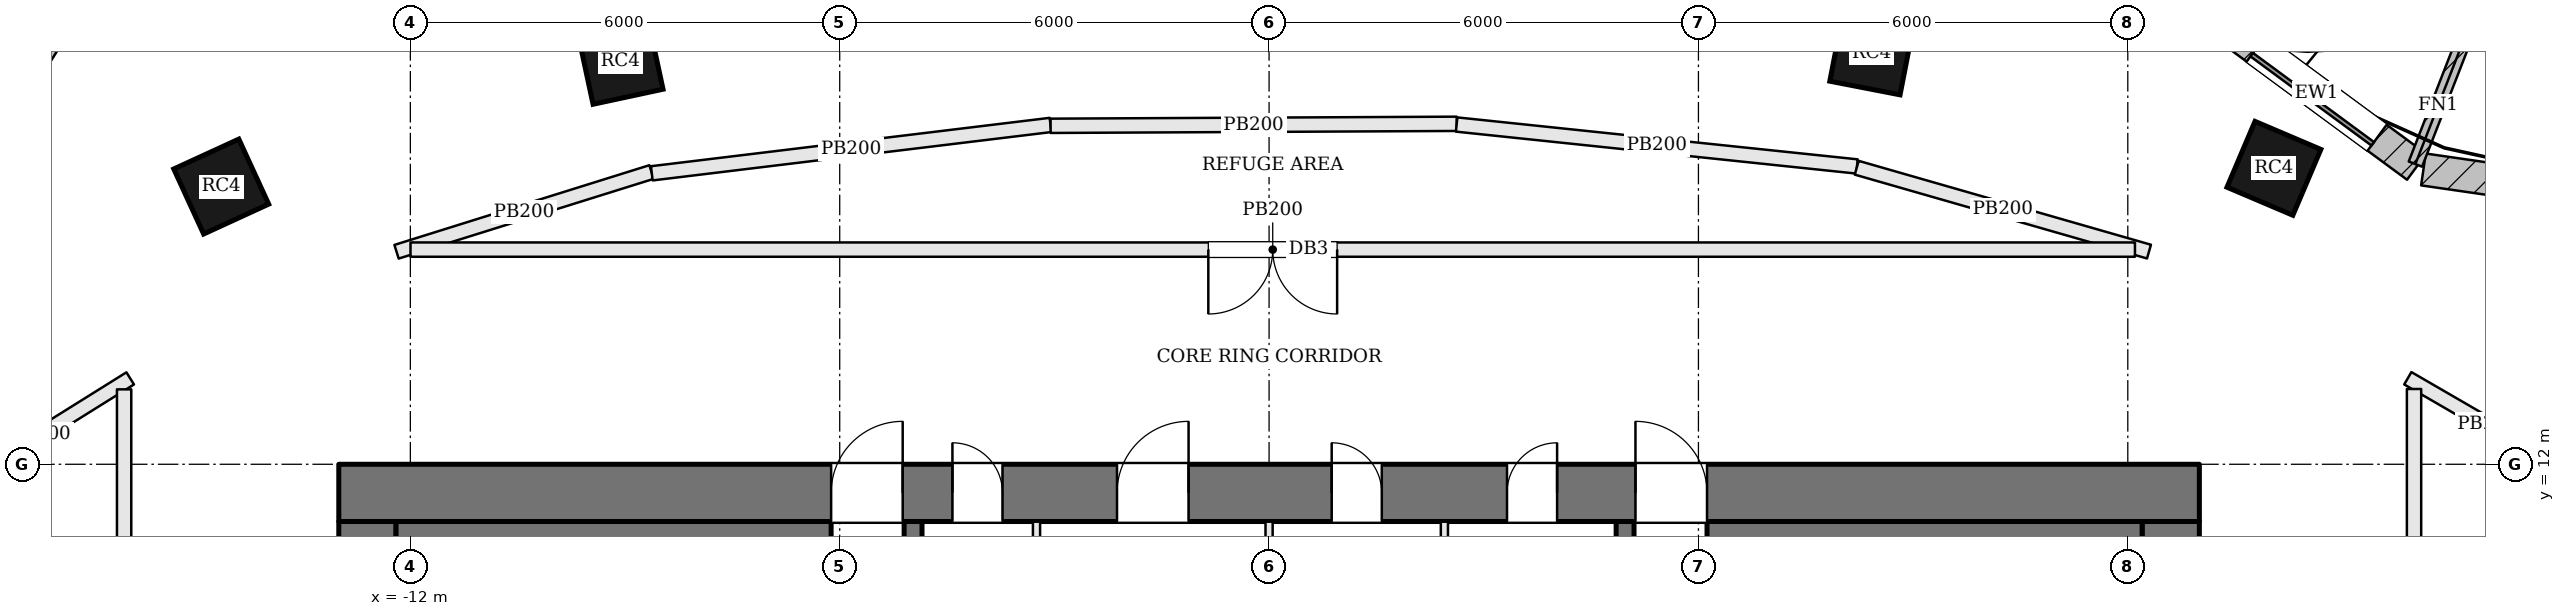
"""IFC4 building model, lengths in metres.
Left out: names, types, materials, properties, quantities, classifications, styles, units other than length and angle.
Written with IfcOpenShell. Run it as: python <this file> out.ifc"""

import sys

from ifc_helpers import new_model, si_unit, direction, frame, frame_2d, origin, origin_2d, place, context, subcontext, project, spatial, rectangle, extrude, element, fill, save


model = new_model("IFC4")
c1 = context("Model", 3, precision=1e-05, world=origin(), true_north=direction((0.0, 1.0)))
c2 = subcontext(c1, "Body", "Model", "MODEL_VIEW")
j1 = project(units=[si_unit("LENGTHUNIT", "METRE"), si_unit("PLANEANGLEUNIT", "RADIAN")], contexts=[c1])
p1 = place(None, origin())
s1 = spatial("IfcSite", under=j1, at=p1, CompositionType="ELEMENT")
p2 = place(p1, origin())
s2 = spatial("IfcBuilding", under=s1, at=p2, CompositionType="ELEMENT")
p3 = place(p2, frame((0.0, 0.0, 193.5)))
s3 = spatial("IfcBuildingStorey", under=s2, at=p3, CompositionType="ELEMENT", Elevation=193.5)
p4 = place(p3, frame((-13.0, 11.6, 0.0), z_axis=(0.0, 0.0, 1.0), x_axis=(1.0, 0.0, 0.0)))
e1 = element("IfcWall", 1, at=p4, inside=s3, PredefinedType="SHEAR", context=c2, shape_type="SweptSolid", body=[
    extrude(rectangle(XDim=26.0, YDim=0.8, at=frame_2d((13.0, 0.0))), origin(), (0.0, 0.0, 1.0), 3.9),
])
p5 = place(p4, frame((8.575, 0.0, 0.0)))
e2 = element("IfcOpeningElement", 2, at=p5, cuts=e1, PredefinedType="OPENING", context=c2, shape_type="SweptSolid", body=[
    extrude(rectangle(XDim=0.7, YDim=2.1, at=frame_2d((0.35, 1.05))), frame((0.0, 0.41, 0.0), z_axis=(0.0, -1.0, 0.0), x_axis=(1.0, 0.0, 0.0)), (0.0, 0.0, 1.0), 0.82),
])
p6 = place(p4, frame((10.875, 0.0, 0.0)))
e3 = element("IfcOpeningElement", 3, at=p6, cuts=e1, PredefinedType="OPENING", context=c2, shape_type="SweptSolid", body=[
    extrude(rectangle(XDim=1.0, YDim=2.1, at=frame_2d((0.5, 1.05))), frame((0.0, 0.41, 0.0), z_axis=(0.0, -1.0, 0.0), x_axis=(1.0, 0.0, 0.0)), (0.0, 0.0, 1.0), 0.82),
])
p7 = place(p4, frame((13.875, 0.0, 0.0)))
e4 = element("IfcOpeningElement", 4, at=p7, cuts=e1, PredefinedType="OPENING", context=c2, shape_type="SweptSolid", body=[
    extrude(rectangle(XDim=0.7, YDim=2.1, at=frame_2d((0.35, 1.05))), frame((0.0, 0.41, 0.0), z_axis=(0.0, -1.0, 0.0), x_axis=(1.0, 0.0, 0.0)), (0.0, 0.0, 1.0), 0.82),
])
p8 = place(p4, frame((16.325, 0.0, 0.0)))
e5 = element("IfcOpeningElement", 5, at=p8, cuts=e1, PredefinedType="OPENING", context=c2, shape_type="SweptSolid", body=[
    extrude(rectangle(XDim=0.7, YDim=2.1, at=frame_2d((0.35, 1.05))), frame((0.0, 0.41, 0.0), z_axis=(0.0, -1.0, 0.0), x_axis=(1.0, 0.0, 0.0)), (0.0, 0.0, 1.0), 0.82),
])
p9 = place(p4, frame((6.88, 0.0, 0.0)))
e6 = element("IfcOpeningElement", 6, at=p9, cuts=e1, PredefinedType="OPENING", context=c2, shape_type="SweptSolid", body=[
    extrude(rectangle(XDim=1.0, YDim=2.1, at=frame_2d((0.5, 1.05))), frame((0.0, 0.41, 0.0), z_axis=(0.0, -1.0, 0.0), x_axis=(1.0, 0.0, 0.0)), (0.0, 0.0, 1.0), 0.82),
])
p10 = place(p4, frame((18.12, 0.0, 0.0)))
e7 = element("IfcOpeningElement", 7, at=p10, cuts=e1, PredefinedType="OPENING", context=c2, shape_type="SweptSolid", body=[
    extrude(rectangle(XDim=1.0, YDim=2.1, at=frame_2d((0.5, 1.05))), frame((0.0, 0.41, 0.0), z_axis=(0.0, -1.0, 0.0), x_axis=(1.0, 0.0, 0.0)), (0.0, 0.0, 1.0), 0.82),
])
p11 = place(p3, frame((12.6, -2.2, 0.0), z_axis=(0.0, 0.0, 1.0), x_axis=(0.0, 1.0, 0.0)))
e8 = element("IfcWall", 8, at=p11, inside=s3, PredefinedType="SHEAR", context=c2, shape_type="SweptSolid", body=[
    extrude(rectangle(XDim=13.4, YDim=0.8, at=frame_2d((6.7, 0.0))), origin(), (0.0, 0.0, 1.0), 3.9),
])
p12 = place(p11, frame((7.4, 0.0, 0.0)))
e9 = element("IfcOpeningElement", 9, at=p12, cuts=e8, PredefinedType="OPENING", context=c2, shape_type="SweptSolid", body=[
    extrude(rectangle(XDim=1.8, YDim=2.1, at=frame_2d((0.9, 1.05))), frame((0.0, 0.41, 0.0), z_axis=(0.0, -1.0, 0.0), x_axis=(1.0, 0.0, 0.0)), (0.0, 0.0, 1.0), 0.82),
])
p13 = place(p3, frame((-12.6, -2.2, 0.0), z_axis=(0.0, 0.0, 1.0), x_axis=(0.0, 1.0, 0.0)))
e10 = element("IfcWall", 10, at=p13, inside=s3, PredefinedType="SHEAR", context=c2, shape_type="SweptSolid", body=[
    extrude(rectangle(XDim=13.4, YDim=0.8, at=frame_2d((6.7, 0.0))), origin(), (0.0, 0.0, 1.0), 3.9),
])
p14 = place(p13, frame((4.2, 0.0, 0.0)))
e11 = element("IfcOpeningElement", 11, at=p14, cuts=e10, PredefinedType="OPENING", context=c2, shape_type="SweptSolid", body=[
    extrude(rectangle(XDim=1.8, YDim=2.1, at=frame_2d((0.9, 1.05))), frame((0.0, 0.41, 0.0), z_axis=(0.0, -1.0, 0.0), x_axis=(1.0, 0.0, 0.0)), (0.0, 0.0, 1.0), 0.82),
])
for number, where, z_axis, x_axis in (
    (12, (14.042, 16.136, 0.0), (0.0, 0.0, 1.0), (-0.92, 0.392, 0.0)),
    (13, (8.422, 17.749, 0.0), (0.0, 0.0, 1.0), (-0.982, 0.191, 0.0)),
    (14, (-9.063, 17.625, 0.0), (0.0, 0.0, 1.0), (-0.978, -0.21, 0.0)),
    (15, (-14.643, 15.881, 0.0), (0.0, 0.0, 1.0), (-0.909, -0.417, 0.0)),
):
    element("IfcColumn", number, at=place(p3, frame(where, z_axis=z_axis, x_axis=x_axis)), inside=s3, PredefinedType="COLUMN", context=c2, shape_type="SweptSolid", body=[
        extrude(rectangle(XDim=1.0, YDim=1.0, at=origin_2d()), origin(), (0.0, 0.0, 1.0), 3.9),
    ])
p15 = place(p3, frame((21.825, 15.297, 0.0), z_axis=(0.0, 0.0, 1.0), x_axis=(-0.98971474215, 0.143054986527, 0.0)))
e16 = element("IfcWall", 16, at=p15, inside=s3, PredefinedType="SOLIDWALL", context=c2, shape_type="SweptSolid", body=[
    extrude(rectangle(XDim=5.753, YDim=0.45, at=frame_2d((2.876, 0.0))), origin(), (0.0, 0.0, 1.0), 3.7),
])
p16 = place(p15, frame((1.826, 0.0, 0.9)))
e17 = element("IfcOpeningElement", 17, at=p16, cuts=e16, PredefinedType="OPENING", context=c2, shape_type="SweptSolid", body=[
    extrude(rectangle(XDim=2.1, YDim=2.3, at=frame_2d((1.05, 1.15))), frame((0.0, 0.235, 0.0), z_axis=(0.0, -1.0, 0.0), x_axis=(1.0, 0.0, 0.0)), (0.0, 0.0, 1.0), 0.47),
])
p17 = place(p3, frame((16.036, 16.158, 0.0), z_axis=(0.0, 0.0, 1.0), x_axis=(-0.805181432967, 0.593028549064, 0.0)))
e18 = element("IfcWall", 18, at=p17, inside=s3, PredefinedType="SOLIDWALL", context=c2, shape_type="SweptSolid", body=[
    extrude(rectangle(XDim=3.469, YDim=0.45, at=frame_2d((1.734, 0.0))), origin(), (0.0, 0.0, 1.0), 3.7),
])
p18 = place(p17, frame((0.684, 0.0, 0.9)))
e19 = element("IfcOpeningElement", 19, at=p18, cuts=e18, PredefinedType="OPENING", context=c2, shape_type="SweptSolid", body=[
    extrude(rectangle(XDim=2.1, YDim=2.3, at=frame_2d((1.05, 1.15))), frame((0.0, 0.235, 0.0), z_axis=(0.0, -1.0, 0.0), x_axis=(1.0, 0.0, 0.0)), (0.0, 0.0, 1.0), 0.47),
])
p19 = place(p3, frame((-16.998, 18.099, 0.0), z_axis=(0.0, 0.0, 1.0), x_axis=(-0.532745661304, -0.846275404559, 0.0)))
e20 = element("IfcWall", 20, at=p19, inside=s3, PredefinedType="SOLIDWALL", context=c2, shape_type="SweptSolid", body=[
    extrude(rectangle(XDim=5.076, YDim=0.45, at=frame_2d((2.538, 0.0))), origin(), (0.0, 0.0, 1.0), 3.7),
])
p20 = place(p19, frame((1.638, 0.0, 0.9)))
e21 = element("IfcOpeningElement", 21, at=p20, cuts=e20, PredefinedType="OPENING", context=c2, shape_type="SweptSolid", body=[
    extrude(rectangle(XDim=1.8, YDim=2.3, at=frame_2d((0.9, 1.15))), frame((0.0, 0.235, 0.0), z_axis=(0.0, -1.0, 0.0), x_axis=(1.0, 0.0, 0.0)), (0.0, 0.0, 1.0), 0.47),
])
p21 = place(p3, frame((16.019, 16.195, 0.0), z_axis=(0.0, 0.0, 1.0), x_axis=(0.362641522028, 0.931928713208, 0.0)))
e22 = element("IfcWall", 22, at=p21, inside=s3, PredefinedType="SOLIDWALL", context=c2, shape_type="SweptSolid", body=[
    extrude(rectangle(XDim=1.75, YDim=0.2, at=frame_2d((0.875, 0.0))), origin(), (0.0, 0.0, 1.0), 3.7),
])
p22 = place(p3, frame((-4.975, -2.2, 0.0), z_axis=(0.0, 0.0, 1.0), x_axis=(0.0, 1.0, 0.0)))
e23 = element("IfcWall", 23, at=p22, inside=s3, PredefinedType="SOLIDWALL", context=c2, shape_type="SweptSolid", body=[
    extrude(rectangle(XDim=13.4, YDim=0.25, at=frame_2d((6.7, 0.0))), origin(), (0.0, 0.0, 1.0), 3.7),
])
p23 = place(p22, frame((5.25, 0.0, 0.0)))
e24 = element("IfcOpeningElement", 24, at=p23, cuts=e23, PredefinedType="OPENING", context=c2, shape_type="SweptSolid", body=[
    extrude(rectangle(XDim=1.2, YDim=2.1, at=frame_2d((0.6, 1.05))), frame((0.0, 0.135, 0.0), z_axis=(0.0, -1.0, 0.0), x_axis=(1.0, 0.0, 0.0)), (0.0, 0.0, 1.0), 0.27),
])
p24 = place(p3, frame((4.975, 11.2, 0.0), z_axis=(0.0, 0.0, 1.0), x_axis=(0.0, -1.0, 0.0)))
e25 = element("IfcWall", 25, at=p24, inside=s3, PredefinedType="SOLIDWALL", context=c2, shape_type="SweptSolid", body=[
    extrude(rectangle(XDim=13.4, YDim=0.25, at=frame_2d((6.7, 0.0))), origin(), (0.0, 0.0, 1.0), 3.7),
])
p25 = place(p24, frame((5.25, 0.0, 0.0)))
e26 = element("IfcOpeningElement", 26, at=p25, cuts=e25, PredefinedType="OPENING", context=c2, shape_type="SweptSolid", body=[
    extrude(rectangle(XDim=1.2, YDim=2.1, at=frame_2d((0.6, 1.05))), frame((0.0, 0.135, 0.0), z_axis=(0.0, -1.0, 0.0), x_axis=(1.0, 0.0, 0.0)), (0.0, 0.0, 1.0), 0.27),
])
for number, where, z_axis, x_axis in (
    (27, (-12.2, 10.9, 0.0), (0.0, 0.0, 1.0), (1.0, 0.0, 0.0)),
    (28, (12.2, 10.9, 0.0), (0.0, 0.0, 1.0), (-1.0, 0.0, 0.0)),
):
    element("IfcWall", number, at=place(p3, frame(where, z_axis=z_axis, x_axis=x_axis)), inside=s3, PredefinedType="SOLIDWALL", context=c2, shape_type="SweptSolid", body=[
        extrude(rectangle(XDim=6.08, YDim=0.6, at=frame_2d((3.04, 0.0))), origin(), (0.0, 0.0, 1.0), 3.7),
    ])
for number, where, z_axis, x_axis in (
    (29, (-3.25, 8.6, 0.0), (0.0, 0.0, 1.0), (0.0, 1.0, 0.0)),
    (30, (0.0, 8.6, 0.0), (0.0, 0.0, 1.0), (0.0, 1.0, 0.0)),
    (31, (2.45, 8.6, 0.0), (0.0, 0.0, 1.0), (0.0, 1.0, 0.0)),
):
    element("IfcWall", number, at=place(p3, frame(where, z_axis=z_axis, x_axis=x_axis)), inside=s3, PredefinedType="PARTITIONING", context=c2, shape_type="SweptSolid", body=[
        extrude(rectangle(XDim=2.6, YDim=0.1, at=frame_2d((1.3, 0.0))), origin(), (0.0, 0.0, 1.0), 3.7),
    ])
p26 = place(p3, frame((-18.422, 11.635, 0.0), z_axis=(0.0, 0.0, 1.0), x_axis=(0.848299824463, 0.529516201656, 0.0)))
e32 = element("IfcWall", 32, at=p26, inside=s3, PredefinedType="PARTITIONING", context=c2, shape_type="SweptSolid", body=[
    extrude(rectangle(XDim=2.955, YDim=0.2, at=frame_2d((1.478, 0.0))), origin(), (0.0, 0.0, 1.0), 3.7),
])
p27 = place(p3, frame((-16.0, 13.047, 0.0), z_axis=(0.0, 0.0, 1.0), x_axis=(0.0, -1.0, 0.0)))
e33 = element("IfcWall", 33, at=p27, inside=s3, PredefinedType="PARTITIONING", context=c2, shape_type="SweptSolid", body=[
    extrude(rectangle(XDim=18.947, YDim=0.2, at=frame_2d((9.474, 0.0))), origin(), (0.0, 0.0, 1.0), 3.7),
])
p28 = place(p27, frame((7.647, 0.0, 0.0)))
e34 = element("IfcOpeningElement", 34, at=p28, cuts=e33, PredefinedType="OPENING", context=c2, shape_type="SweptSolid", body=[
    extrude(rectangle(XDim=1.8, YDim=2.1, at=frame_2d((0.9, 1.05))), frame((0.0, 0.11, 0.0), z_axis=(0.0, -1.0, 0.0), x_axis=(1.0, 0.0, 0.0)), (0.0, 0.0, 1.0), 0.22),
])
p29 = place(p3, frame((15.913, 13.202, 0.0), z_axis=(0.0, 0.0, 1.0), x_axis=(0.86524014554, -0.501357647339, 0.0)))
e35 = element("IfcWall", 35, at=p29, inside=s3, PredefinedType="PARTITIONING", context=c2, shape_type="SweptSolid", body=[
    extrude(rectangle(XDim=2.575, YDim=0.2, at=frame_2d((1.288, 0.0))), origin(), (0.0, 0.0, 1.0), 3.7),
])
p30 = place(p3, frame((16.0, -5.9, 0.0), z_axis=(0.0, 0.0, 1.0), x_axis=(0.0, 1.0, 0.0)))
e36 = element("IfcWall", 36, at=p30, inside=s3, PredefinedType="PARTITIONING", context=c2, shape_type="SweptSolid", body=[
    extrude(rectangle(XDim=18.952, YDim=0.2, at=frame_2d((9.476, 0.0))), origin(), (0.0, 0.0, 1.0), 3.7),
])
p31 = place(p30, frame((9.5, 0.0, 0.0)))
e37 = element("IfcOpeningElement", 37, at=p31, cuts=e36, PredefinedType="OPENING", context=c2, shape_type="SweptSolid", body=[
    extrude(rectangle(XDim=1.8, YDim=2.1, at=frame_2d((0.9, 1.05))), frame((0.0, 0.11, 0.0), z_axis=(0.0, -1.0, 0.0), x_axis=(1.0, 0.0, 0.0)), (0.0, 0.0, 1.0), 0.22),
])
p32 = place(p3, frame((-12.193, 14.97, 0.0), z_axis=(0.0, 0.0, 1.0), x_axis=(0.954441570864, 0.298397868301, 0.0)))
e38 = element("IfcWall", 38, at=p32, inside=s3, PredefinedType="PARTITIONING", context=c2, shape_type="SweptSolid", body=[
    extrude(rectangle(XDim=3.733, YDim=0.2, at=frame_2d((1.867, 0.0))), origin(), (0.0, 0.0, 1.0), 3.7),
])
p33 = place(p3, frame((-8.626, 16.066, 0.0), z_axis=(0.0, 0.0, 1.0), x_axis=(0.992720392358, 0.120441780942, 0.0)))
e39 = element("IfcWall", 39, at=p33, inside=s3, PredefinedType="PARTITIONING", context=c2, shape_type="SweptSolid", body=[
    extrude(rectangle(XDim=5.613, YDim=0.2, at=frame_2d((2.806, 0.0))), origin(), (0.0, 0.0, 1.0), 3.7),
])
p34 = place(p3, frame((-3.053, 16.73, 0.0), z_axis=(0.0, 0.0, 1.0), x_axis=(0.999987762334, 0.004947239951, 0.0)))
e40 = element("IfcWall", 40, at=p34, inside=s3, PredefinedType="PARTITIONING", context=c2, shape_type="SweptSolid", body=[
    extrude(rectangle(XDim=5.675, YDim=0.2, at=frame_2d((2.837, 0.0))), origin(), (0.0, 0.0, 1.0), 3.7),
])
p35 = place(p3, frame((2.621, 16.748, 0.0), z_axis=(0.0, 0.0, 1.0), x_axis=(0.99455907377, -0.104174127222, 0.0)))
e41 = element("IfcWall", 41, at=p35, inside=s3, PredefinedType="PARTITIONING", context=c2, shape_type="SweptSolid", body=[
    extrude(rectangle(XDim=5.625, YDim=0.2, at=frame_2d((2.812, 0.0))), origin(), (0.0, 0.0, 1.0), 3.7),
])
p36 = place(p3, frame((8.212, 16.144, 0.0), z_axis=(0.0, 0.0, 1.0), x_axis=(0.961195849484, -0.275866886261, 0.0)))
e42 = element("IfcWall", 42, at=p36, inside=s3, PredefinedType="PARTITIONING", context=c2, shape_type="SweptSolid", body=[
    extrude(rectangle(XDim=4.249, YDim=0.2, at=frame_2d((2.125, 0.0))), origin(), (0.0, 0.0, 1.0), 3.7),
])
p37 = place(p3, frame((12.1, 15.0, 0.0), z_axis=(0.0, 0.0, 1.0), x_axis=(-1.0, 0.0, 0.0)))
e43 = element("IfcWall", 43, at=p37, inside=s3, PredefinedType="PARTITIONING", context=c2, shape_type="SweptSolid", body=[
    extrude(rectangle(XDim=24.098, YDim=0.2, at=frame_2d((12.049, 0.0))), origin(), (0.0, 0.0, 1.0), 3.7),
])
p38 = place(p37, frame((11.149, 0.0, 0.0)))
e44 = element("IfcOpeningElement", 44, at=p38, cuts=e43, PredefinedType="OPENING", context=c2, shape_type="SweptSolid", body=[
    extrude(rectangle(XDim=1.8, YDim=2.1, at=frame_2d((0.9, 1.05))), frame((0.0, 0.11, 0.0), z_axis=(0.0, -1.0, 0.0), x_axis=(1.0, 0.0, 0.0)), (0.0, 0.0, 1.0), 0.22),
])
p39 = place(p18, origin())
e45 = element("IfcWindow", 45, at=p39, inside=s3, PartitioningType="SINGLE_PANEL", PredefinedType="WINDOW", context=c2, shape_type="SweptSolid", body=[
    extrude(rectangle(XDim=2.1, YDim=2.3, at=frame_2d((1.05, 1.15))), frame((0.0, 0.135, 0.0), z_axis=(0.0, -1.0, 0.0), x_axis=(1.0, 0.0, 0.0)), (0.0, 0.0, 1.0), 0.06),
])
fill(e19, e45)
p40 = place(p5, origin())
e46 = element("IfcDoor", 46, at=p40, inside=s3, OperationType="SINGLE_SWING_LEFT", PredefinedType="DOOR", context=c2, shape_type="SweptSolid", body=[
    extrude(rectangle(XDim=0.7, YDim=2.1, at=frame_2d((0.35, 1.05))), frame((0.0, 0.025, 0.0), z_axis=(0.0, -1.0, 0.0), x_axis=(1.0, 0.0, 0.0)), (0.0, 0.0, 1.0), 0.05),
])
fill(e2, e46)
p41 = place(p6, origin())
e47 = element("IfcDoor", 47, at=p41, inside=s3, OperationType="SINGLE_SWING_RIGHT", PredefinedType="DOOR", context=c2, shape_type="SweptSolid", body=[
    extrude(rectangle(XDim=1.0, YDim=2.1, at=frame_2d((0.5, 1.05))), frame((0.0, 0.025, 0.0), z_axis=(0.0, -1.0, 0.0), x_axis=(1.0, 0.0, 0.0)), (0.0, 0.0, 1.0), 0.05),
])
fill(e3, e47)
p42 = place(p7, origin())
e48 = element("IfcDoor", 48, at=p42, inside=s3, OperationType="SINGLE_SWING_LEFT", PredefinedType="DOOR", context=c2, shape_type="SweptSolid", body=[
    extrude(rectangle(XDim=0.7, YDim=2.1, at=frame_2d((0.35, 1.05))), frame((0.0, 0.025, 0.0), z_axis=(0.0, -1.0, 0.0), x_axis=(1.0, 0.0, 0.0)), (0.0, 0.0, 1.0), 0.05),
])
fill(e4, e48)
p43 = place(p8, origin())
e49 = element("IfcDoor", 49, at=p43, inside=s3, OperationType="SINGLE_SWING_RIGHT", PredefinedType="DOOR", context=c2, shape_type="SweptSolid", body=[
    extrude(rectangle(XDim=0.7, YDim=2.1, at=frame_2d((0.35, 1.05))), frame((0.0, 0.025, 0.0), z_axis=(0.0, -1.0, 0.0), x_axis=(1.0, 0.0, 0.0)), (0.0, 0.0, 1.0), 0.05),
])
fill(e5, e49)
p44 = place(p9, origin())
e50 = element("IfcDoor", 50, at=p44, inside=s3, OperationType="SINGLE_SWING_RIGHT", PredefinedType="DOOR", context=c2, shape_type="SweptSolid", body=[
    extrude(rectangle(XDim=1.0, YDim=2.1, at=frame_2d((0.5, 1.05))), frame((0.0, 0.025, 0.0), z_axis=(0.0, -1.0, 0.0), x_axis=(1.0, 0.0, 0.0)), (0.0, 0.0, 1.0), 0.05),
])
fill(e6, e50)
p45 = place(p10, origin())
e51 = element("IfcDoor", 51, at=p45, inside=s3, OperationType="SINGLE_SWING_LEFT", PredefinedType="DOOR", context=c2, shape_type="SweptSolid", body=[
    extrude(rectangle(XDim=1.0, YDim=2.1, at=frame_2d((0.5, 1.05))), frame((0.0, 0.025, 0.0), z_axis=(0.0, -1.0, 0.0), x_axis=(1.0, 0.0, 0.0)), (0.0, 0.0, 1.0), 0.05),
])
fill(e7, e51)
p46 = place(p38, origin())
e52 = element("IfcDoor", 52, at=p46, inside=s3, OperationType="DOUBLE_DOOR_SINGLE_SWING", PredefinedType="DOOR", context=c2, shape_type="SweptSolid", body=[
    extrude(rectangle(XDim=1.8, YDim=2.1, at=frame_2d((0.9, 1.05))), frame((0.0, 0.025, 0.0), z_axis=(0.0, -1.0, 0.0), x_axis=(1.0, 0.0, 0.0)), (0.0, 0.0, 1.0), 0.05),
])
fill(e44, e52)
save(model, sys.argv[1])
